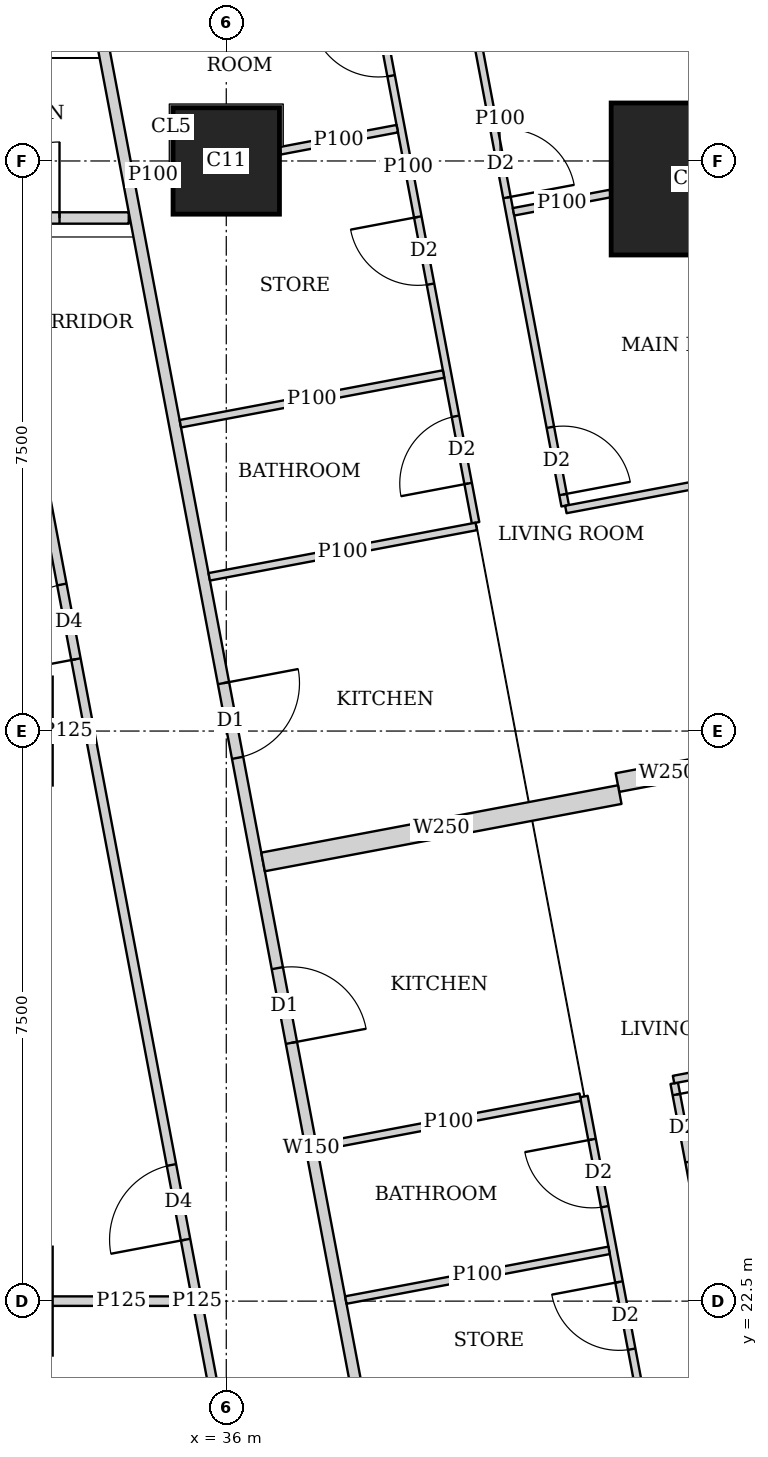
"""IFC4 building model, lengths in metres.
Left out: names, types, materials, properties, quantities, classifications, styles, units other than length and angle.
Written with IfcOpenShell. Run it as: python <this file> out.ifc"""

import sys

from ifc_helpers import new_model, si_unit, direction, frame, frame_2d, origin, origin_2d, place, context, subcontext, project, spatial, rectangle, extrude, element, fill, save


model = new_model("IFC4")
c1 = context("Model", 3, precision=1e-05, world=origin(), true_north=direction((0.0, 1.0)))
c2 = subcontext(c1, "Body", "Model", "MODEL_VIEW")
j1 = project(units=[si_unit("LENGTHUNIT", "METRE"), si_unit("PLANEANGLEUNIT", "RADIAN")], contexts=[c1])
p1 = place(None, origin())
s1 = spatial("IfcSite", under=j1, at=p1, CompositionType="ELEMENT")
p2 = place(p1, origin())
s2 = spatial("IfcBuilding", under=s1, at=p2, CompositionType="ELEMENT")
p3 = place(p2, frame((0.0, 0.0, 274.1)))
s3 = spatial("IfcBuildingStorey", under=s2, at=p3, CompositionType="ELEMENT", Elevation=274.1)
p4 = place(p3, frame((36.0, 37.5, 0.0), z_axis=(0.0, 0.0, 1.0), x_axis=(1.0, 0.0, 0.0)))
e1 = element("IfcColumn", 1, at=p4, inside=s3, PredefinedType="COLUMN", context=c2, shape_type="SweptSolid", body=[
    extrude(rectangle(XDim=1.4, YDim=1.4, at=origin_2d()), origin(), (0.0, 0.0, 1.0), 3.75),
])
p5 = place(p3, frame((42.064, 37.263, 0.0), z_axis=(0.0, 0.0, 1.0), x_axis=(1.0, 0.0, 0.0)))
e2 = element("IfcColumn", 2, at=p5, inside=s3, PredefinedType="COLUMN", context=c2, shape_type="SweptSolid", body=[
    extrude(rectangle(XDim=2.0, YDim=2.0, at=origin_2d()), origin(), (0.0, 0.0, 1.0), 3.75),
])
p6 = place(p3, frame((29.501, 36.75, 0.0), z_axis=(0.0, 0.0, 1.0), x_axis=(1.0, 0.0, 0.0)))
e3 = element("IfcWall", 3, at=p6, inside=s3, PredefinedType="SOLIDWALL", context=c2, shape_type="SweptSolid", body=[
    extrude(rectangle(XDim=5.216, YDim=0.15, at=frame_2d((2.608, 0.0))), origin(), (0.0, 0.0, 1.0), 3.5),
])
p7 = place(p6, frame((3.305, 0.0, 0.0)))
e4 = element("IfcOpeningElement", 4, at=p7, cuts=e3, PredefinedType="OPENING", context=c2, shape_type="SweptSolid", body=[
    extrude(rectangle(XDim=1.0, YDim=2.1, at=frame_2d((0.5, 1.05))), frame((0.0, 0.085, 0.0), z_axis=(0.0, -1.0, 0.0), x_axis=(1.0, 0.0, 0.0)), (0.0, 0.0, 1.0), 0.17),
])
p8 = place(p3, frame((33.781, 42.186, 0.0), z_axis=(0.0, 0.0, 1.0), x_axis=(0.185593518645, -0.9826266055, 0.0)))
e5 = element("IfcWall", 5, at=p8, inside=s3, PredefinedType="SOLIDWALL", context=c2, shape_type="SweptSolid", body=[
    extrude(rectangle(XDim=35.961, YDim=0.15, at=frame_2d((17.98, 0.0))), origin(), (0.0, 0.0, 1.0), 2.5),
])
p9 = place(p8, frame((11.76, 0.0, 0.0)))
e6 = element("IfcOpeningElement", 6, at=p9, cuts=e5, PredefinedType="OPENING", context=c2, shape_type="SweptSolid", body=[
    extrude(rectangle(XDim=1.0, YDim=2.1, at=frame_2d((0.5, 1.05))), frame((0.0, 0.085, 0.0), z_axis=(0.0, -1.0, 0.0), x_axis=(1.0, 0.0, 0.0)), (0.0, 0.0, 1.0), 0.17),
])
p10 = place(p8, frame((15.576, 0.0, 0.0)))
e7 = element("IfcOpeningElement", 7, at=p10, cuts=e5, PredefinedType="OPENING", context=c2, shape_type="SweptSolid", body=[
    extrude(rectangle(XDim=1.0, YDim=2.1, at=frame_2d((0.5, 1.05))), frame((0.0, 0.085, 0.0), z_axis=(0.0, -1.0, 0.0), x_axis=(1.0, 0.0, 0.0)), (0.0, 0.0, 1.0), 0.17),
])
p11 = place(p8, frame((30.502, 0.0, 0.0)))
e8 = element("IfcOpeningElement", 8, at=p11, cuts=e5, PredefinedType="OPENING", context=c2, shape_type="SweptSolid", body=[
    extrude(rectangle(XDim=1.0, YDim=2.1, at=frame_2d((0.5, 1.05))), frame((0.0, 0.085, 0.0), z_axis=(0.0, -1.0, 0.0), x_axis=(1.0, 0.0, 0.0)), (0.0, 0.0, 1.0), 0.17),
])
p12 = place(p3, frame((38.744, 42.045, 0.0), z_axis=(0.0, 0.0, 1.0), x_axis=(0.185588352162, -0.982627581305, 0.0)))
e9 = element("IfcWall", 9, at=p12, inside=s3, PredefinedType="PARTITIONING", context=c2, shape_type="SweptSolid", body=[
    extrude(rectangle(XDim=9.241, YDim=0.1, at=frame_2d((4.621, 0.0))), origin(), (0.0, 0.0, 1.0), 3.5),
])
p13 = place(p12, frame((8.191, 0.0, 0.0)))
e10 = element("IfcOpeningElement", 10, at=p13, cuts=e9, PredefinedType="OPENING", context=c2, shape_type="SweptSolid", body=[
    extrude(rectangle(XDim=0.9, YDim=2.1, at=frame_2d((0.45, 1.05))), frame((0.0, 0.06, 0.0), z_axis=(0.0, -1.0, 0.0), x_axis=(1.0, 0.0, 0.0)), (0.0, 0.0, 1.0), 0.12),
])
p14 = place(p12, frame((4.215, 0.0, 0.0)))
e11 = element("IfcOpeningElement", 11, at=p14, cuts=e9, PredefinedType="OPENING", context=c2, shape_type="SweptSolid", body=[
    extrude(rectangle(XDim=0.9, YDim=2.1, at=frame_2d((0.45, 1.05))), frame((0.0, 0.06, 0.0), z_axis=(0.0, -1.0, 0.0), x_axis=(1.0, 0.0, 0.0)), (0.0, 0.0, 1.0), 0.12),
])
p15 = place(p3, frame((37.51, 42.109, 0.0), z_axis=(0.0, 0.0, 1.0), x_axis=(0.185659798122, -0.982614084654, 0.0)))
e12 = element("IfcWall", 12, at=p15, inside=s3, PredefinedType="PARTITIONING", context=c2, shape_type="SweptSolid", body=[
    extrude(rectangle(XDim=9.534, YDim=0.1, at=frame_2d((4.767, 0.0))), origin(), (0.0, 0.0, 1.0), 3.5),
])
p16 = place(p15, frame((8.109, 0.0, 0.0)))
e13 = element("IfcOpeningElement", 13, at=p16, cuts=e12, PredefinedType="OPENING", context=c2, shape_type="SweptSolid", body=[
    extrude(rectangle(XDim=0.9, YDim=2.1, at=frame_2d((0.45, 1.05))), frame((0.0, 0.06, 0.0), z_axis=(0.0, -1.0, 0.0), x_axis=(1.0, 0.0, 0.0)), (0.0, 0.0, 1.0), 0.12),
])
p17 = place(p15, frame((2.65, 0.0, 0.0)))
e14 = element("IfcOpeningElement", 14, at=p17, cuts=e12, PredefinedType="OPENING", context=c2, shape_type="SweptSolid", body=[
    extrude(rectangle(XDim=0.9, YDim=2.1, at=frame_2d((0.45, 1.05))), frame((0.0, 0.06, 0.0), z_axis=(0.0, -1.0, 0.0), x_axis=(1.0, 0.0, 0.0)), (0.0, 0.0, 1.0), 0.12),
])
p18 = place(p15, frame((5.44, 0.0, 0.0)))
e15 = element("IfcOpeningElement", 15, at=p18, cuts=e12, PredefinedType="OPENING", context=c2, shape_type="SweptSolid", body=[
    extrude(rectangle(XDim=0.9, YDim=2.1, at=frame_2d((0.45, 1.05))), frame((0.0, 0.06, 0.0), z_axis=(0.0, -1.0, 0.0), x_axis=(1.0, 0.0, 0.0)), (0.0, 0.0, 1.0), 0.12),
])
p19 = place(p3, frame((41.054, 37.072, 0.0), z_axis=(0.0, 0.0, 1.0), x_axis=(-0.982602741717, -0.185719821156, 0.0)))
e16 = element("IfcWall", 16, at=p19, inside=s3, PredefinedType="PARTITIONING", context=c2, shape_type="SweptSolid", body=[
    extrude(rectangle(XDim=1.297, YDim=0.1, at=frame_2d((0.649, 0.0))), origin(), (0.0, 0.0, 1.0), 3.5),
])
p20 = place(p3, frame((44.693, 33.713, 0.0), z_axis=(0.0, 0.0, 1.0), x_axis=(-0.982633535512, -0.185556823879, 0.0)))
e17 = element("IfcWall", 17, at=p20, inside=s3, PredefinedType="PARTITIONING", context=c2, shape_type="SweptSolid", body=[
    extrude(rectangle(XDim=4.3, YDim=0.1, at=frame_2d((2.15, 0.0))), origin(), (0.0, 0.0, 1.0), 2.5),
])
p21 = place(p3, frame((38.25, 37.925, 0.0), z_axis=(0.0, 0.0, 1.0), x_axis=(-0.982610209589, -0.185680305934, 0.0)))
e18 = element("IfcWall", 18, at=p21, inside=s3, PredefinedType="PARTITIONING", context=c2, shape_type="SweptSolid", body=[
    extrude(rectangle(XDim=1.567, YDim=0.1, at=frame_2d((0.784, 0.0))), origin(), (0.0, 0.0, 1.0), 3.5),
])
p22 = place(p3, frame((35.29, 37.366, 0.0), z_axis=(0.0, 0.0, 1.0), x_axis=(-0.982715597703, -0.185121727606, 0.0)))
e19 = element("IfcWall", 19, at=p22, inside=s3, PredefinedType="PARTITIONING", context=c2, shape_type="SweptSolid", body=[
    extrude(rectangle(XDim=0.513, YDim=0.1, at=frame_2d((0.256, 0.0))), origin(), (0.0, 0.0, 1.0), 3.5),
])
p23 = place(p3, frame((39.289, 32.692, 0.0), z_axis=(0.0, 0.0, 1.0), x_axis=(-0.982662827464, -0.185401638399, 0.0)))
e20 = element("IfcWall", 20, at=p23, inside=s3, PredefinedType="PARTITIONING", context=c2, shape_type="SweptSolid", body=[
    extrude(rectangle(XDim=3.575, YDim=0.1, at=frame_2d((1.788, 0.0))), origin(), (0.0, 0.0, 1.0), 3.5),
])
p24 = place(p3, frame((38.859, 34.697, 0.0), z_axis=(0.0, 0.0, 1.0), x_axis=(-0.982626628545, -0.185593396635, 0.0)))
e21 = element("IfcWall", 21, at=p24, inside=s3, PredefinedType="PARTITIONING", context=c2, shape_type="SweptSolid", body=[
    extrude(rectangle(XDim=3.524, YDim=0.1, at=frame_2d((1.762, 0.0))), origin(), (0.0, 0.0, 1.0), 3.5),
])
p25 = place(p3, frame((41.894, 25.366, 0.0), z_axis=(0.0, 0.0, 1.0), x_axis=(0.185612905165, -0.982622943675, 0.0)))
e22 = element("IfcWall", 22, at=p25, inside=s3, PredefinedType="PARTITIONING", context=c2, shape_type="SweptSolid", body=[
    extrude(rectangle(XDim=9.827, YDim=0.1, at=frame_2d((4.913, 0.0))), origin(), (0.0, 0.0, 1.0), 2.5),
])
p26 = place(p25, frame((0.151, 0.0, 0.0)))
e23 = element("IfcOpeningElement", 23, at=p26, cuts=e22, PredefinedType="OPENING", context=c2, shape_type="SweptSolid", body=[
    extrude(rectangle(XDim=0.9, YDim=2.1, at=frame_2d((0.45, 1.05))), frame((0.0, 0.06, 0.0), z_axis=(0.0, -1.0, 0.0), x_axis=(1.0, 0.0, 0.0)), (0.0, 0.0, 1.0), 0.12),
])
p27 = place(p25, frame((5.05, 0.0, 0.0)))
e24 = element("IfcOpeningElement", 24, at=p27, cuts=e22, PredefinedType="OPENING", context=c2, shape_type="SweptSolid", body=[
    extrude(rectangle(XDim=0.9, YDim=2.1, at=frame_2d((0.45, 1.05))), frame((0.0, 0.06, 0.0), z_axis=(0.0, -1.0, 0.0), x_axis=(1.0, 0.0, 0.0)), (0.0, 0.0, 1.0), 0.12),
])
p28 = place(p25, frame((7.783, 0.0, 0.0)))
e25 = element("IfcOpeningElement", 25, at=p28, cuts=e22, PredefinedType="OPENING", context=c2, shape_type="SweptSolid", body=[
    extrude(rectangle(XDim=0.9, YDim=2.1, at=frame_2d((0.45, 1.05))), frame((0.0, 0.06, 0.0), z_axis=(0.0, -1.0, 0.0), x_axis=(1.0, 0.0, 0.0)), (0.0, 0.0, 1.0), 0.12),
])
p29 = place(p3, frame((40.706, 25.192, 0.0), z_axis=(0.0, 0.0, 1.0), x_axis=(0.185629824463, -0.982619747547, 0.0)))
e26 = element("IfcWall", 26, at=p29, inside=s3, PredefinedType="PARTITIONING", context=c2, shape_type="SweptSolid", body=[
    extrude(rectangle(XDim=9.659, YDim=0.1, at=frame_2d((4.83, 0.0))), origin(), (0.0, 0.0, 1.0), 2.5),
])
p30 = place(p29, frame((0.575, 0.0, 0.0)))
e27 = element("IfcOpeningElement", 27, at=p30, cuts=e26, PredefinedType="OPENING", context=c2, shape_type="SweptSolid", body=[
    extrude(rectangle(XDim=0.9, YDim=2.1, at=frame_2d((0.45, 1.05))), frame((0.0, 0.06, 0.0), z_axis=(0.0, -1.0, 0.0), x_axis=(1.0, 0.0, 0.0)), (0.0, 0.0, 1.0), 0.12),
])
p31 = place(p29, frame((4.166, 0.0, 0.0)))
e28 = element("IfcOpeningElement", 28, at=p31, cuts=e26, PredefinedType="OPENING", context=c2, shape_type="SweptSolid", body=[
    extrude(rectangle(XDim=0.9, YDim=2.1, at=frame_2d((0.45, 1.05))), frame((0.0, 0.06, 0.0), z_axis=(0.0, -1.0, 0.0), x_axis=(1.0, 0.0, 0.0)), (0.0, 0.0, 1.0), 0.12),
])
p32 = place(p29, frame((2.483, 0.0, 0.0)))
e29 = element("IfcOpeningElement", 29, at=p32, cuts=e26, PredefinedType="OPENING", context=c2, shape_type="SweptSolid", body=[
    extrude(rectangle(XDim=0.9, YDim=2.1, at=frame_2d((0.45, 1.05))), frame((0.0, 0.06, 0.0), z_axis=(0.0, -1.0, 0.0), x_axis=(1.0, 0.0, 0.0)), (0.0, 0.0, 1.0), 0.12),
])
p33 = place(p29, frame((6.074, 0.0, 0.0)))
e30 = element("IfcOpeningElement", 30, at=p33, cuts=e26, PredefinedType="OPENING", context=c2, shape_type="SweptSolid", body=[
    extrude(rectangle(XDim=0.9, YDim=2.1, at=frame_2d((0.45, 1.05))), frame((0.0, 0.06, 0.0), z_axis=(0.0, -1.0, 0.0), x_axis=(1.0, 0.0, 0.0)), (0.0, 0.0, 1.0), 0.12),
])
p34 = place(p3, frame((46.11, 26.213, 0.0), z_axis=(0.0, 0.0, 1.0), x_axis=(-0.982633535512, -0.185556823879, 0.0)))
e31 = element("IfcWall", 31, at=p34, inside=s3, PredefinedType="PARTITIONING", context=c2, shape_type="SweptSolid", body=[
    extrude(rectangle(XDim=4.3, YDim=0.1, at=frame_2d((2.15, 0.0))), origin(), (0.0, 0.0, 1.0), 2.5),
])
p35 = place(p3, frame((40.657, 25.183, 0.0), z_axis=(0.0, 0.0, 1.0), x_axis=(-0.982585626838, -0.185810349366, 0.0)))
e32 = element("IfcWall", 32, at=p35, inside=s3, PredefinedType="PARTITIONING", context=c2, shape_type="SweptSolid", body=[
    extrude(rectangle(XDim=3.525, YDim=0.1, at=frame_2d((1.763, 0.0))), origin(), (0.0, 0.0, 1.0), 3.5),
])
p36 = place(p3, frame((41.037, 23.168, 0.0), z_axis=(0.0, 0.0, 1.0), x_axis=(-0.982638553676, -0.185530247748, 0.0)))
e33 = element("IfcWall", 33, at=p36, inside=s3, PredefinedType="PARTITIONING", context=c2, shape_type="SweptSolid", body=[
    extrude(rectangle(XDim=3.525, YDim=0.1, at=frame_2d((1.763, 0.0))), origin(), (0.0, 0.0, 1.0), 2.5),
])
p37 = place(p3, frame((42.456, 29.57, 0.0), z_axis=(0.0, 0.0, 1.0), x_axis=(-0.982517742323, -0.18616897169, 0.0)))
e34 = element("IfcWall", 34, at=p37, inside=s3, PredefinedType="SOLIDWALL", context=c2, shape_type="SweptSolid", body=[
    extrude(rectangle(XDim=1.332, YDim=0.25, at=frame_2d((0.666, 0.0))), origin(), (0.0, 0.0, 1.0), 2.5),
])
p38 = place(p3, frame((41.177, 29.164, 0.0), z_axis=(0.0, 0.0, 1.0), x_axis=(-0.982642846239, -0.185507511263, 0.0)))
e35 = element("IfcWall", 35, at=p38, inside=s3, PredefinedType="SOLIDWALL", context=c2, shape_type="SweptSolid", body=[
    extrude(rectangle(XDim=4.776, YDim=0.25, at=frame_2d((2.388, 0.0))), origin(), (0.0, 0.0, 1.0), 2.5),
])
p39 = place(p3, frame((37.947, 10.163, 0.0), z_axis=(0.0, 0.0, 1.0), x_axis=(-0.185572770922, 0.982630523998, 0.0)))
e36 = element("IfcWall", 36, at=p39, inside=s3, PredefinedType="PARTITIONING", context=c2, shape_type="SweptSolid", body=[
    extrude(rectangle(XDim=25.111, YDim=0.125, at=frame_2d((12.556, 0.0))), origin(), (0.0, 0.0, 1.0), 2.5),
])
p40 = place(p39, frame((0.708, 0.0, 0.0)))
e37 = element("IfcOpeningElement", 37, at=p40, cuts=e36, PredefinedType="OPENING", context=c2, shape_type="SweptSolid", body=[
    extrude(rectangle(XDim=1.0, YDim=2.1, at=frame_2d((0.5, 1.05))), frame((0.0, 0.073, 0.0), z_axis=(0.0, -1.0, 0.0), x_axis=(1.0, 0.0, 0.0)), (0.0, 0.0, 1.0), 0.145),
])
p41 = place(p39, frame((5.9, 0.0, 0.0)))
e38 = element("IfcOpeningElement", 38, at=p41, cuts=e36, PredefinedType="OPENING", context=c2, shape_type="SweptSolid", body=[
    extrude(rectangle(XDim=1.0, YDim=2.1, at=frame_2d((0.5, 1.05))), frame((0.0, 0.073, 0.0), z_axis=(0.0, -1.0, 0.0), x_axis=(1.0, 0.0, 0.0)), (0.0, 0.0, 1.0), 0.145),
])
p42 = place(p39, frame((13.378, 0.0, 0.0)))
e39 = element("IfcOpeningElement", 39, at=p42, cuts=e36, PredefinedType="OPENING", context=c2, shape_type="SweptSolid", body=[
    extrude(rectangle(XDim=1.0, YDim=2.1, at=frame_2d((0.5, 1.05))), frame((0.0, 0.073, 0.0), z_axis=(0.0, -1.0, 0.0), x_axis=(1.0, 0.0, 0.0)), (0.0, 0.0, 1.0), 0.145),
])
p43 = place(p39, frame((21.15, 0.0, 0.0)))
e40 = element("IfcOpeningElement", 40, at=p43, cuts=e36, PredefinedType="OPENING", context=c2, shape_type="SweptSolid", body=[
    extrude(rectangle(XDim=1.0, YDim=2.1, at=frame_2d((0.5, 1.05))), frame((0.0, 0.073, 0.0), z_axis=(0.0, -1.0, 0.0), x_axis=(1.0, 0.0, 0.0)), (0.0, 0.0, 1.0), 0.145),
])
p44 = place(p3, frame((33.701, 22.5, 0.0), z_axis=(0.0, 0.0, 1.0), x_axis=(1.0, 0.0, 0.0)))
e41 = element("IfcWall", 41, at=p44, inside=s3, PredefinedType="PARTITIONING", context=c2, shape_type="SweptSolid", body=[
    extrude(rectangle(XDim=1.841, YDim=0.125, at=frame_2d((0.92, 0.0))), origin(), (0.0, 0.0, 1.0), 2.5),
])
p45 = place(p3, frame((33.701, 30.0, 0.0), z_axis=(0.0, 0.0, 1.0), x_axis=(1.0, 0.0, 0.0)))
e42 = element("IfcWall", 42, at=p45, inside=s3, PredefinedType="PARTITIONING", context=c2, shape_type="SweptSolid", body=[
    extrude(rectangle(XDim=0.424, YDim=0.125, at=frame_2d((0.212, 0.0))), origin(), (0.0, 0.0, 1.0), 2.5),
])
p46 = place(p13, origin())
e43 = element("IfcDoor", 43, at=p46, inside=s3, OperationType="SINGLE_SWING_RIGHT", PredefinedType="DOOR", context=c2, shape_type="SweptSolid", body=[
    extrude(rectangle(XDim=0.9, YDim=2.1, at=frame_2d((0.45, 1.05))), frame((0.0, 0.025, 0.0), z_axis=(0.0, -1.0, 0.0), x_axis=(1.0, 0.0, 0.0)), (0.0, 0.0, 1.0), 0.05),
])
fill(e10, e43)
p47 = place(p14, origin())
e44 = element("IfcDoor", 44, at=p47, inside=s3, OperationType="SINGLE_SWING_RIGHT", PredefinedType="DOOR", context=c2, shape_type="SweptSolid", body=[
    extrude(rectangle(XDim=0.9, YDim=2.1, at=frame_2d((0.45, 1.05))), frame((0.0, 0.025, 0.0), z_axis=(0.0, -1.0, 0.0), x_axis=(1.0, 0.0, 0.0)), (0.0, 0.0, 1.0), 0.05),
])
fill(e11, e44)
p48 = place(p16, origin())
e45 = element("IfcDoor", 45, at=p48, inside=s3, OperationType="SINGLE_SWING_LEFT", PredefinedType="DOOR", context=c2, shape_type="SweptSolid", body=[
    extrude(rectangle(XDim=0.9, YDim=2.1, at=frame_2d((0.45, 1.05))), frame((0.0, 0.025, 0.0), z_axis=(0.0, -1.0, 0.0), x_axis=(1.0, 0.0, 0.0)), (0.0, 0.0, 1.0), 0.05),
])
fill(e13, e45)
p49 = place(p17, origin())
e46 = element("IfcDoor", 46, at=p49, inside=s3, OperationType="SINGLE_SWING_RIGHT", PredefinedType="DOOR", context=c2, shape_type="SweptSolid", body=[
    extrude(rectangle(XDim=0.9, YDim=2.1, at=frame_2d((0.45, 1.05))), frame((0.0, 0.025, 0.0), z_axis=(0.0, -1.0, 0.0), x_axis=(1.0, 0.0, 0.0)), (0.0, 0.0, 1.0), 0.05),
])
fill(e14, e46)
p50 = place(p18, origin())
e47 = element("IfcDoor", 47, at=p50, inside=s3, OperationType="SINGLE_SWING_RIGHT", PredefinedType="DOOR", context=c2, shape_type="SweptSolid", body=[
    extrude(rectangle(XDim=0.9, YDim=2.1, at=frame_2d((0.45, 1.05))), frame((0.0, 0.025, 0.0), z_axis=(0.0, -1.0, 0.0), x_axis=(1.0, 0.0, 0.0)), (0.0, 0.0, 1.0), 0.05),
])
fill(e15, e47)
p51 = place(p9, origin())
e48 = element("IfcDoor", 48, at=p51, inside=s3, OperationType="SINGLE_SWING_LEFT", PredefinedType="DOOR", context=c2, shape_type="SweptSolid", body=[
    extrude(rectangle(XDim=1.0, YDim=2.1, at=frame_2d((0.5, 1.05))), frame((0.0, 0.025, 0.0), z_axis=(0.0, -1.0, 0.0), x_axis=(1.0, 0.0, 0.0)), (0.0, 0.0, 1.0), 0.05),
])
fill(e6, e48)
p52 = place(p26, origin())
e49 = element("IfcDoor", 49, at=p52, inside=s3, OperationType="SINGLE_SWING_LEFT", PredefinedType="DOOR", context=c2, shape_type="SweptSolid", body=[
    extrude(rectangle(XDim=0.9, YDim=2.1, at=frame_2d((0.45, 1.05))), frame((0.0, 0.025, 0.0), z_axis=(0.0, -1.0, 0.0), x_axis=(1.0, 0.0, 0.0)), (0.0, 0.0, 1.0), 0.05),
])
fill(e23, e49)
p53 = place(p30, origin())
e50 = element("IfcDoor", 50, at=p53, inside=s3, OperationType="SINGLE_SWING_RIGHT", PredefinedType="DOOR", context=c2, shape_type="SweptSolid", body=[
    extrude(rectangle(XDim=0.9, YDim=2.1, at=frame_2d((0.45, 1.05))), frame((0.0, 0.025, 0.0), z_axis=(0.0, -1.0, 0.0), x_axis=(1.0, 0.0, 0.0)), (0.0, 0.0, 1.0), 0.05),
])
fill(e27, e50)
p54 = place(p32, origin())
e51 = element("IfcDoor", 51, at=p54, inside=s3, OperationType="SINGLE_SWING_RIGHT", PredefinedType="DOOR", context=c2, shape_type="SweptSolid", body=[
    extrude(rectangle(XDim=0.9, YDim=2.1, at=frame_2d((0.45, 1.05))), frame((0.0, 0.025, 0.0), z_axis=(0.0, -1.0, 0.0), x_axis=(1.0, 0.0, 0.0)), (0.0, 0.0, 1.0), 0.05),
])
fill(e29, e51)
p55 = place(p10, origin())
e52 = element("IfcDoor", 52, at=p55, inside=s3, OperationType="SINGLE_SWING_RIGHT", PredefinedType="DOOR", context=c2, shape_type="SweptSolid", body=[
    extrude(rectangle(XDim=1.0, YDim=2.1, at=frame_2d((0.5, 1.05))), frame((0.0, 0.025, 0.0), z_axis=(0.0, -1.0, 0.0), x_axis=(1.0, 0.0, 0.0)), (0.0, 0.0, 1.0), 0.05),
])
fill(e7, e52)
p56 = place(p7, origin())
e53 = element("IfcDoor", 53, at=p56, inside=s3, OperationType="SINGLE_SWING_RIGHT", PredefinedType="DOOR", context=c2, shape_type="SweptSolid", body=[
    extrude(rectangle(XDim=1.0, YDim=2.1, at=frame_2d((0.5, 1.05))), frame((0.0, 0.025, 0.0), z_axis=(0.0, -1.0, 0.0), x_axis=(1.0, 0.0, 0.0)), (0.0, 0.0, 1.0), 0.05),
])
fill(e4, e53)
p57 = place(p42, origin())
e54 = element("IfcDoor", 54, at=p57, inside=s3, OperationType="SINGLE_SWING_LEFT", PredefinedType="DOOR", context=c2, shape_type="SweptSolid", body=[
    extrude(rectangle(XDim=1.0, YDim=2.1, at=frame_2d((0.5, 1.05))), frame((0.0, 0.025, 0.0), z_axis=(0.0, -1.0, 0.0), x_axis=(1.0, 0.0, 0.0)), (0.0, 0.0, 1.0), 0.05),
])
fill(e39, e54)
p58 = place(p43, origin())
e55 = element("IfcDoor", 55, at=p58, inside=s3, OperationType="SINGLE_SWING_LEFT", PredefinedType="DOOR", context=c2, shape_type="SweptSolid", body=[
    extrude(rectangle(XDim=1.0, YDim=2.1, at=frame_2d((0.5, 1.05))), frame((0.0, 0.025, 0.0), z_axis=(0.0, -1.0, 0.0), x_axis=(1.0, 0.0, 0.0)), (0.0, 0.0, 1.0), 0.05),
])
fill(e40, e55)
save(model, sys.argv[1])
